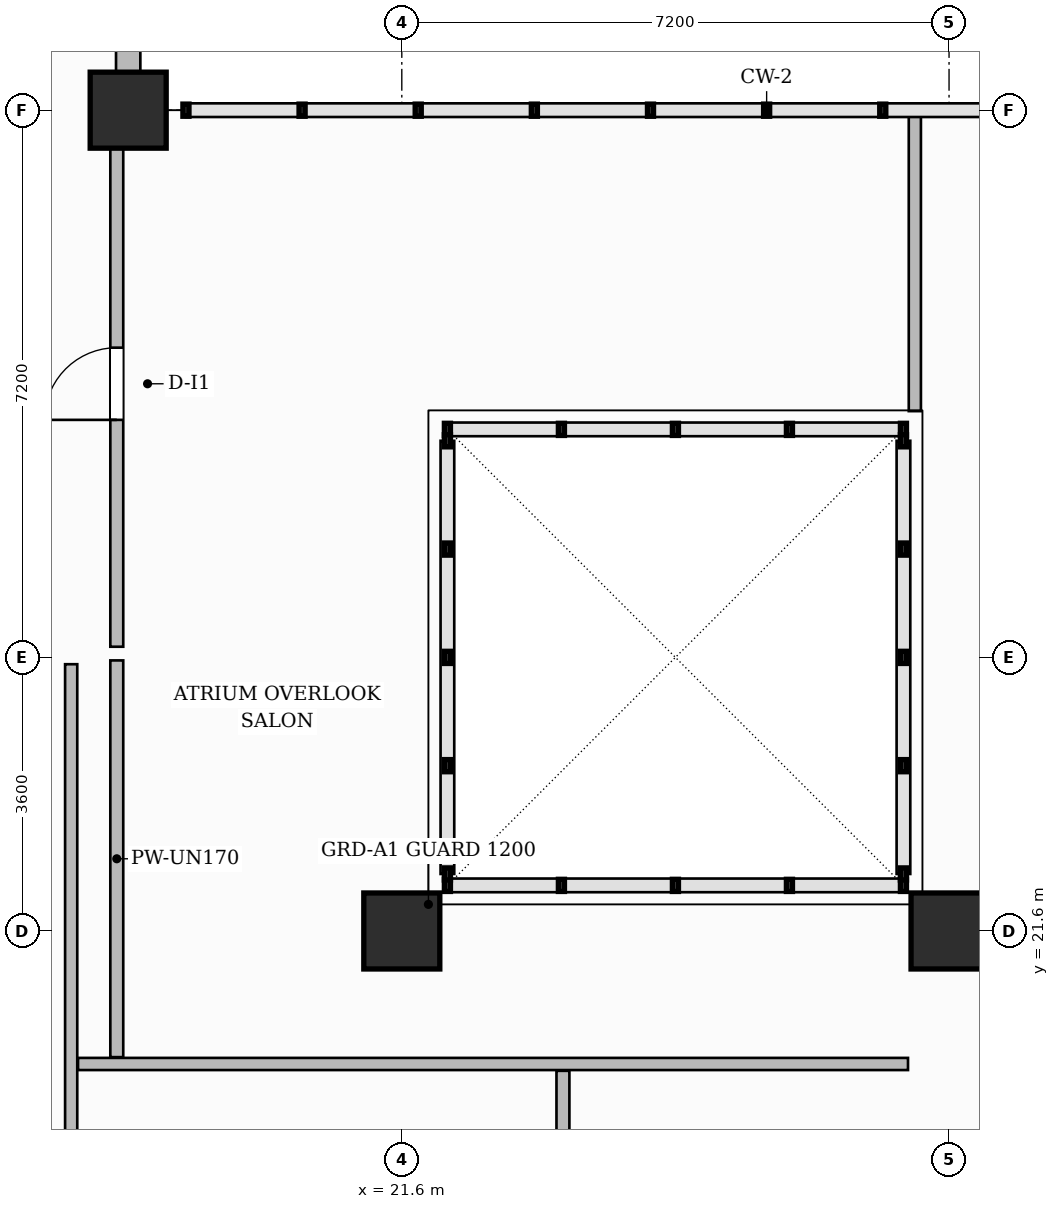
"""IFC4 building model, lengths in metres.
Left out: names, types, materials, properties, quantities, classifications, styles, units other than length and angle.
Written with IfcOpenShell. Run it as: python <this file> out.ifc"""

import sys

from ifc_helpers import new_model, si_unit, direction, frame, frame_2d, origin, origin_2d, place, context, subcontext, project, spatial, rectangle, extrude, source, transform, mapped, element, fill, save


model = new_model("IFC4")
c1 = context("Model", 3, precision=1e-05, world=origin(), true_north=direction((0.0, 1.0)))
c2 = subcontext(c1, "Body", "Model", "MODEL_VIEW")
j1 = project(units=[si_unit("LENGTHUNIT", "METRE"), si_unit("PLANEANGLEUNIT", "RADIAN")], contexts=[c1])
p1 = place(None, origin())
s1 = spatial("IfcSite", under=j1, at=p1, CompositionType="ELEMENT")
p2 = place(p1, origin())
s2 = spatial("IfcBuilding", under=s1, at=p2, CompositionType="ELEMENT")
p3 = place(p2, frame((0.0, 0.0, 115.5)))
s3 = spatial("IfcBuildingStorey", under=s2, at=p3, CompositionType="ELEMENT", Elevation=115.5)
m1 = source(origin(), c2, "Body", "SweptSolid", [
    extrude(rectangle(XDim=1.0, YDim=1.0, at=origin_2d()), origin(), (0.0, 0.0, 1.0), 3.7),
])
for number, where, z_axis, x_axis in (
    (1, (21.6, 21.6, 0.0), (0.0, 0.0, 1.0), (1.0, 0.0, 0.0)),
    (2, (28.8, 21.6, 0.0), (0.0, 0.0, 1.0), (1.0, 0.0, 0.0)),
    (3, (18.0, 32.4, 0.0), (0.0, 0.0, 1.0), (1.0, 0.0, 0.0)),
):
    element("IfcColumn", number, at=place(p3, frame(where, z_axis=z_axis, x_axis=x_axis)), inside=s3, PredefinedType="COLUMN", context=c2, shape_type="MappedRepresentation", body=[
        mapped(m1, transform((0.0, 0.0, 0.0), scale=1.0)),
    ])
p4 = place(p3, frame((17.25, 11.76, 0.0), z_axis=(0.0, 0.0, 1.0), x_axis=(0.0, 1.0, 0.0)))
e4 = element("IfcWall", 4, at=p4, inside=s3, PredefinedType="PARTITIONING", context=c2, shape_type="SweptSolid", body=[
    extrude(rectangle(XDim=13.35, YDim=0.16, at=frame_2d((6.675, 0.0))), origin(), (0.0, 0.0, 1.0), 3.45),
])
p5 = place(p3, frame((17.85, 19.94, 0.0), z_axis=(0.0, 0.0, 1.0), x_axis=(0.0, 1.0, 0.0)))
e5 = element("IfcWall", 5, at=p5, inside=s3, PredefinedType="PARTITIONING", context=c2, shape_type="SweptSolid", body=[
    extrude(rectangle(XDim=5.22, YDim=0.17, at=frame_2d((2.61, 0.0))), origin(), (0.0, 0.0, 1.0), 3.105),
])
p6 = place(p3, frame((17.85, 25.34, 0.0), z_axis=(0.0, 0.0, 1.0), x_axis=(0.0, 1.0, 0.0)))
e6 = element("IfcWall", 6, at=p6, inside=s3, PredefinedType="PARTITIONING", context=c2, shape_type="SweptSolid", body=[
    extrude(rectangle(XDim=6.87, YDim=0.17, at=frame_2d((3.435, 0.0))), origin(), (0.0, 0.0, 1.0), 3.45),
])
p7 = place(p6, frame((2.985, 0.0, 0.0)))
e7 = element("IfcOpeningElement", 7, at=p7, cuts=e6, PredefinedType="OPENING", context=c2, shape_type="SweptSolid", body=[
    extrude(rectangle(XDim=0.95, YDim=2.15, at=frame_2d((0.475, 1.075))), frame((0.0, 0.095, 0.0), z_axis=(0.0, -1.0, 0.0), x_axis=(1.0, 0.0, 0.0)), (0.0, 0.0, 1.0), 0.19),
])
p8 = place(p3, frame((28.35, 28.44, 0.0), z_axis=(0.0, 0.0, 1.0), x_axis=(0.0, 1.0, 0.0)))
e8 = element("IfcWall", 8, at=p8, inside=s3, PredefinedType="PARTITIONING", context=c2, shape_type="SweptSolid", body=[
    extrude(rectangle(XDim=3.932, YDim=0.16, at=frame_2d((1.966, 0.0))), origin(), (0.0, 0.0, 1.0), 3.45),
])
p9 = place(p3, frame((17.34, 19.85, 0.0), z_axis=(0.0, 0.0, 1.0), x_axis=(1.0, 0.0, 0.0)))
e9 = element("IfcWall", 9, at=p9, inside=s3, PredefinedType="PARTITIONING", context=c2, shape_type="SweptSolid", body=[
    extrude(rectangle(XDim=10.92, YDim=0.16, at=frame_2d((5.46, 0.0))), origin(), (0.0, 0.0, 1.0), 3.45),
])
p10 = place(p3, frame((23.72, 11.76, 0.0), z_axis=(0.0, 0.0, 1.0), x_axis=(0.0, 1.0, 0.0)))
e10 = element("IfcWall", 10, at=p10, inside=s3, PredefinedType="PARTITIONING", context=c2, shape_type="SweptSolid", body=[
    extrude(rectangle(XDim=8.0, YDim=0.17, at=frame_2d((4.0, 0.0))), origin(), (0.0, 0.0, 1.0), 3.45),
])
p11 = place(p3, frame((18.0, 32.4, 0.0), z_axis=(0.0, 0.0, 1.0), x_axis=(0.0, 1.0, 0.0)))
e11 = element("IfcWall", 11, at=p11, inside=s3, PredefinedType="SOLIDWALL", context=c2, shape_type="SweptSolid", body=[
    extrude(rectangle(XDim=14.35, YDim=0.32, at=frame_2d((7.175, 0.0))), origin(), (0.0, 0.0, 1.0), 3.45),
])
p12 = place(p11, frame((0.85, 0.0, 0.0)))
e12 = element("IfcOpeningElement", 12, at=p12, cuts=e11, PredefinedType="OPENING", context=c2, shape_type="SweptSolid", body=[
    extrude(rectangle(XDim=1.2, YDim=2.2, at=frame_2d((0.6, 1.1))), frame((0.0, 0.17, 0.0), z_axis=(0.0, -1.0, 0.0), x_axis=(1.0, 0.0, 0.0)), (0.0, 0.0, 1.0), 0.34),
])
p13 = place(p11, frame((3.475, 0.0, 0.8)))
e13 = element("IfcOpeningElement", 13, at=p13, cuts=e11, PredefinedType="OPENING", context=c2, shape_type="SweptSolid", body=[
    extrude(rectangle(XDim=1.8, YDim=1.85, at=frame_2d((0.9, 0.925))), frame((0.0, 0.17, 0.0), z_axis=(0.0, -1.0, 0.0), x_axis=(1.0, 0.0, 0.0)), (0.0, 0.0, 1.0), 0.34),
])
p14 = place(p11, frame((8.525, 0.0, 0.8)))
e14 = element("IfcOpeningElement", 14, at=p14, cuts=e11, PredefinedType="OPENING", context=c2, shape_type="SweptSolid", body=[
    extrude(rectangle(XDim=1.8, YDim=1.85, at=frame_2d((0.9, 0.925))), frame((0.0, 0.17, 0.0), z_axis=(0.0, -1.0, 0.0), x_axis=(1.0, 0.0, 0.0)), (0.0, 0.0, 1.0), 0.34),
])
p15 = place(p11, frame((11.275, 0.0, 0.8)))
e15 = element("IfcOpeningElement", 15, at=p15, cuts=e11, PredefinedType="OPENING", context=c2, shape_type="SweptSolid", body=[
    extrude(rectangle(XDim=1.8, YDim=1.85, at=frame_2d((0.9, 0.925))), frame((0.0, 0.17, 0.0), z_axis=(0.0, -1.0, 0.0), x_axis=(1.0, 0.0, 0.0)), (0.0, 0.0, 1.0), 0.34),
])
m2 = source(origin(), c2, "Body", "SweptSolid", [
    extrude(rectangle(XDim=0.95, YDim=2.15, at=frame_2d((0.475, 1.075))), frame((0.0, 0.025, 0.0), z_axis=(0.0, -1.0, 0.0), x_axis=(1.0, 0.0, 0.0)), (0.0, 0.0, 1.0), 0.05),
])
p16 = place(p7, origin())
e16 = element("IfcDoor", 16, at=p16, inside=s3, OperationType="SINGLE_SWING_LEFT", PredefinedType="DOOR", context=c2, shape_type="MappedRepresentation", body=[
    mapped(m2, transform((0.0, 0.0, 0.0), scale=1.0)),
])
fill(e7, e16)
save(model, sys.argv[1])
